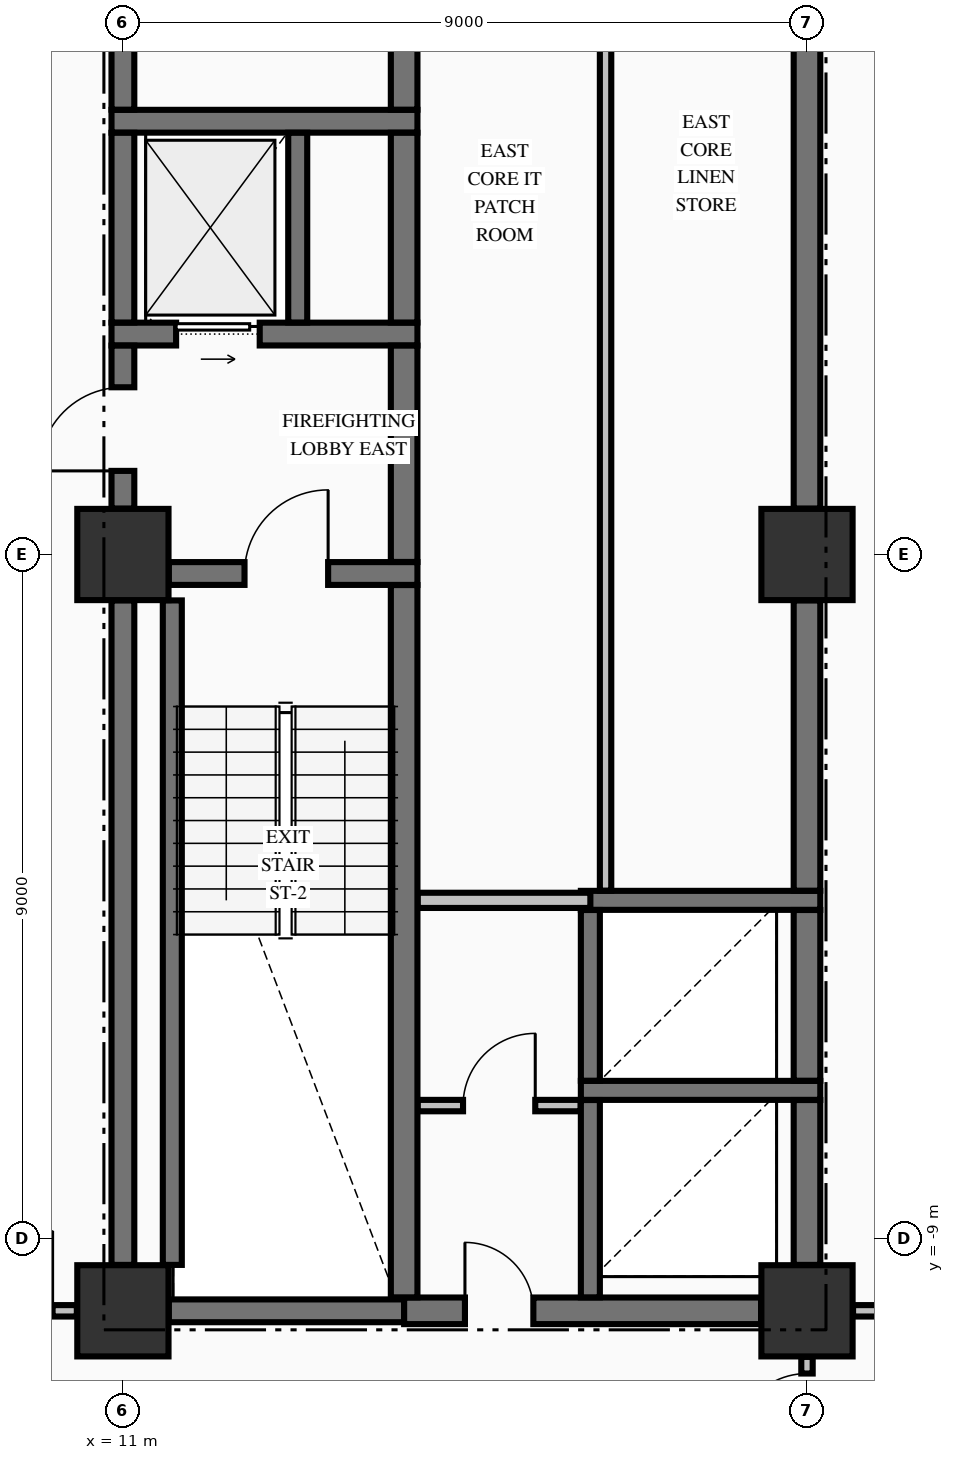
"""IFC4 building model, lengths in metres.
Left out: names, types, materials, properties, quantities, classifications, styles, units other than length and angle.
Written with IfcOpenShell. Run it as: python <this file> out.ifc"""

import sys

from ifc_helpers import new_model, si_unit, direction, frame, frame_2d, origin, origin_2d, place, context, subcontext, project, spatial, rectangle, extrude, element, fill, save


model = new_model("IFC4")
c1 = context("Model", 3, precision=1e-05, world=origin(), true_north=direction((0.0, 1.0)))
c2 = subcontext(c1, "Body", "Model", "MODEL_VIEW")
j1 = project(units=[si_unit("LENGTHUNIT", "METRE"), si_unit("PLANEANGLEUNIT", "RADIAN")], contexts=[c1])
p1 = place(None, origin())
s1 = spatial("IfcSite", under=j1, at=p1, CompositionType="ELEMENT")
p2 = place(p1, origin())
s2 = spatial("IfcBuilding", under=s1, at=p2, CompositionType="ELEMENT")
p3 = place(p2, frame((0.0, 0.0, 78.61)))
s3 = spatial("IfcBuildingStorey", under=s2, at=p3, CompositionType="ELEMENT", Elevation=78.61)
for number, where, z_axis, x_axis in (
    (1, (11.0, -9.95, -0.25), (0.0, 0.0, 1.0), (1.0, 0.0, 0.0)),
    (2, (11.0, 0.0, -0.25), (0.0, 0.0, 1.0), (1.0, 0.0, 0.0)),
    (3, (20.0, -9.95, -0.25), (0.0, 0.0, 1.0), (1.0, 0.0, 0.0)),
    (4, (20.0, 0.0, -0.25), (0.0, 0.0, 1.0), (1.0, 0.0, 0.0)),
):
    element("IfcColumn", number, at=place(p3, frame(where, z_axis=z_axis, x_axis=x_axis)), inside=s3, PredefinedType="COLUMN", context=c2, shape_type="SweptSolid", body=[
        extrude(rectangle(XDim=1.2, YDim=1.2, at=origin_2d()), origin(), (0.0, 0.0, 1.0), 3.395),
    ])
p4 = place(p3, frame((11.604, -9.95, 0.0), z_axis=(0.0, 0.0, 1.0), x_axis=(1.0, 0.0, 0.0)))
e5 = element("IfcWall", 5, at=p4, inside=s3, PredefinedType="SHEAR", context=c2, shape_type="SweptSolid", body=[
    extrude(rectangle(XDim=3.096, YDim=0.3, at=frame_2d((1.548, 0.0))), origin(), (0.0, 0.0, 1.0), 3.145),
])
p5 = place(p3, frame((14.7, -9.95, 0.0), z_axis=(0.0, 0.0, 1.0), x_axis=(1.0, 0.0, 0.0)))
e6 = element("IfcWall", 6, at=p5, inside=s3, PredefinedType="SHEAR", context=c2, shape_type="SweptSolid", body=[
    extrude(rectangle(XDim=4.696, YDim=0.35, at=frame_2d((2.348, 0.0))), origin(), (0.0, 0.0, 1.0), 3.145),
])
p6 = place(p5, frame((0.8, 0.0, 0.0)))
e7 = element("IfcOpeningElement", 7, at=p6, cuts=e6, PredefinedType="OPENING", context=c2, shape_type="SweptSolid", body=[
    extrude(rectangle(XDim=0.9, YDim=2.15, at=frame_2d((0.45, 1.075))), frame((0.0, 0.185, 0.0), z_axis=(0.0, -1.0, 0.0), x_axis=(1.0, 0.0, 0.0)), (0.0, 0.0, 1.0), 0.37),
])
for number, where, z_axis, x_axis in (
    (8, (17.025, -7.05, 0.0), (0.0, 0.0, 1.0), (1.0, 0.0, 0.0)),
    (9, (17.025, -4.55, 0.0), (0.0, 0.0, 1.0), (1.0, 0.0, 0.0)),
):
    element("IfcWall", number, at=place(p3, frame(where, z_axis=z_axis, x_axis=x_axis)), inside=s3, PredefinedType="SOLIDWALL", context=c2, shape_type="SweptSolid", body=[
        extrude(rectangle(XDim=3.15, YDim=0.25, at=frame_2d((1.575, 0.0))), origin(), (0.0, 0.0, 1.0), 3.145),
    ])
p7 = place(p3, frame((11.604, -0.25, 0.0), z_axis=(0.0, 0.0, 1.0), x_axis=(1.0, 0.0, 0.0)))
e10 = element("IfcWall", 10, at=p7, inside=s3, PredefinedType="SHEAR", context=c2, shape_type="SweptSolid", body=[
    extrude(rectangle(XDim=3.271, YDim=0.3, at=frame_2d((1.635, 0.0))), origin(), (0.0, 0.0, 1.0), 3.145),
])
p8 = place(p7, frame((0.996, 0.0, 0.0)))
e11 = element("IfcOpeningElement", 11, at=p8, cuts=e10, PredefinedType="OPENING", context=c2, shape_type="SweptSolid", body=[
    extrude(rectangle(XDim=1.1, YDim=2.15, at=frame_2d((0.55, 1.075))), frame((0.0, 0.16, 0.0), z_axis=(0.0, -1.0, 0.0), x_axis=(1.0, 0.0, 0.0)), (0.0, 0.0, 1.0), 0.32),
])
p9 = place(p3, frame((10.85, 2.9, 0.0), z_axis=(0.0, 0.0, 1.0), x_axis=(1.0, 0.0, 0.0)))
e12 = element("IfcWall", 12, at=p9, inside=s3, PredefinedType="SHEAR", context=c2, shape_type="SweptSolid", body=[
    extrude(rectangle(XDim=4.025, YDim=0.3, at=frame_2d((2.012, 0.0))), origin(), (0.0, 0.0, 1.0), 3.145),
])
p10 = place(p9, frame((0.85, 0.0, 0.0)))
e13 = element("IfcOpeningElement", 13, at=p10, cuts=e12, PredefinedType="OPENING", context=c2, shape_type="SweptSolid", body=[
    extrude(rectangle(XDim=1.1, YDim=2.2, at=frame_2d((0.55, 1.1))), frame((0.0, 0.16, 0.0), z_axis=(0.0, -1.0, 0.0), x_axis=(1.0, 0.0, 0.0)), (0.0, 0.0, 1.0), 0.32),
])
p11 = place(p3, frame((10.85, 5.7, 0.0), z_axis=(0.0, 0.0, 1.0), x_axis=(1.0, 0.0, 0.0)))
e14 = element("IfcWall", 14, at=p11, inside=s3, PredefinedType="SHEAR", context=c2, shape_type="SweptSolid", body=[
    extrude(rectangle(XDim=4.025, YDim=0.3, at=frame_2d((2.012, 0.0))), origin(), (0.0, 0.0, 1.0), 3.145),
])
p12 = place(p3, frame((-10.394, -9.95, 0.0), z_axis=(0.0, 0.0, 1.0), x_axis=(1.0, 0.0, 0.0)))
e15 = element("IfcWall", 15, at=p12, inside=s3, PredefinedType="PARTITIONING", context=c2, shape_type="SweptSolid", body=[
    extrude(rectangle(XDim=20.788, YDim=0.15, at=frame_2d((10.394, 0.0))), origin(), (0.0, 0.0, 1.0), 3.145),
])
p13 = place(p12, frame((0.319, 0.0, 0.0)))
e16 = element("IfcOpeningElement", 16, at=p13, cuts=e15, PredefinedType="OPENING", context=c2, shape_type="SweptSolid", body=[
    extrude(rectangle(XDim=1.05, YDim=2.15, at=frame_2d((0.525, 1.075))), frame((0.0, 0.085, 0.0), z_axis=(0.0, -1.0, 0.0), x_axis=(1.0, 0.0, 0.0)), (0.0, 0.0, 1.0), 0.17),
])
p14 = place(p12, frame((19.419, 0.0, 0.0)))
e17 = element("IfcOpeningElement", 17, at=p14, cuts=e15, PredefinedType="OPENING", context=c2, shape_type="SweptSolid", body=[
    extrude(rectangle(XDim=1.05, YDim=2.15, at=frame_2d((0.525, 1.075))), frame((0.0, 0.085, 0.0), z_axis=(0.0, -1.0, 0.0), x_axis=(1.0, 0.0, 0.0)), (0.0, 0.0, 1.0), 0.17),
])
p15 = place(p12, frame((11.569, 0.0, 0.0)))
e18 = element("IfcOpeningElement", 18, at=p15, cuts=e15, PredefinedType="OPENING", context=c2, shape_type="SweptSolid", body=[
    extrude(rectangle(XDim=0.95, YDim=2.15, at=frame_2d((0.475, 1.075))), frame((0.0, 0.085, 0.0), z_axis=(0.0, -1.0, 0.0), x_axis=(1.0, 0.0, 0.0)), (0.0, 0.0, 1.0), 0.17),
])
p16 = place(p3, frame((20.606, -9.95, 0.0), z_axis=(0.0, 0.0, 1.0), x_axis=(1.0, 0.0, 0.0)))
e19 = element("IfcWall", 19, at=p16, inside=s3, PredefinedType="PARTITIONING", context=c2, shape_type="SweptSolid", body=[
    extrude(rectangle(XDim=3.229, YDim=0.15, at=frame_2d((1.615, 0.0))), origin(), (0.0, 0.0, 1.0), 3.145),
])
p17 = place(p16, frame((0.894, 0.0, 0.0)))
e20 = element("IfcOpeningElement", 20, at=p17, cuts=e19, PredefinedType="OPENING", context=c2, shape_type="SweptSolid", body=[
    extrude(rectangle(XDim=1.0, YDim=2.15, at=frame_2d((0.5, 1.075))), frame((0.0, 0.085, 0.0), z_axis=(0.0, -1.0, 0.0), x_axis=(1.0, 0.0, 0.0)), (0.0, 0.0, 1.0), 0.17),
])
p18 = place(p3, frame((14.878, -7.25, 0.0), z_axis=(0.0, 0.0, 1.0), x_axis=(1.0, 0.0, 0.0)))
e21 = element("IfcWall", 21, at=p18, inside=s3, PredefinedType="PARTITIONING", context=c2, shape_type="SweptSolid", body=[
    extrude(rectangle(XDim=2.144, YDim=0.15, at=frame_2d((1.072, 0.0))), origin(), (0.0, 0.0, 1.0), 3.145),
])
p19 = place(p18, frame((0.597, 0.0, 0.0)))
e22 = element("IfcOpeningElement", 22, at=p19, cuts=e21, PredefinedType="OPENING", context=c2, shape_type="SweptSolid", body=[
    extrude(rectangle(XDim=0.95, YDim=2.15, at=frame_2d((0.475, 1.075))), frame((0.0, 0.085, 0.0), z_axis=(0.0, -1.0, 0.0), x_axis=(1.0, 0.0, 0.0)), (0.0, 0.0, 1.0), 0.17),
])
p20 = place(p3, frame((14.878, -4.55, 0.0), z_axis=(0.0, 0.0, 1.0), x_axis=(1.0, 0.0, 0.0)))
e23 = element("IfcWall", 23, at=p20, inside=s3, PredefinedType="PARTITIONING", context=c2, shape_type="SweptSolid", body=[
    extrude(rectangle(XDim=2.272, YDim=0.2, at=frame_2d((1.136, 0.0))), origin(), (0.0, 0.0, 1.0), 3.145),
])
p21 = place(p3, frame((11.0, -9.346, 0.0), z_axis=(0.0, 0.0, 1.0), x_axis=(0.0, 1.0, 0.0)))
e24 = element("IfcWall", 24, at=p21, inside=s3, PredefinedType="SHEAR", context=c2, shape_type="SweptSolid", body=[
    extrude(rectangle(XDim=8.742, YDim=0.3, at=frame_2d((4.371, 0.0))), origin(), (0.0, 0.0, 1.0), 3.145),
])
p22 = place(p3, frame((11.0, 0.604, 0.0), z_axis=(0.0, 0.0, 1.0), x_axis=(0.0, 1.0, 0.0)))
e25 = element("IfcWall", 25, at=p22, inside=s3, PredefinedType="SHEAR", context=c2, shape_type="SweptSolid", body=[
    extrude(rectangle(XDim=2.144, YDim=0.3, at=frame_2d((1.072, 0.0))), origin(), (0.0, 0.0, 1.0), 3.145),
])
p23 = place(p22, frame((0.496, 0.0, 0.0)))
e26 = element("IfcOpeningElement", 26, at=p23, cuts=e25, PredefinedType="OPENING", context=c2, shape_type="SweptSolid", body=[
    extrude(rectangle(XDim=1.1, YDim=2.15, at=frame_2d((0.55, 1.075))), frame((0.0, 0.16, 0.0), z_axis=(0.0, -1.0, 0.0), x_axis=(1.0, 0.0, 0.0)), (0.0, 0.0, 1.0), 0.32),
])
p24 = place(p3, frame((11.0, 3.052, 0.0), z_axis=(0.0, 0.0, 1.0), x_axis=(0.0, 1.0, 0.0)))
e27 = element("IfcWall", 27, at=p24, inside=s3, PredefinedType="SHEAR", context=c2, shape_type="SweptSolid", body=[
    extrude(rectangle(XDim=2.496, YDim=0.3, at=frame_2d((1.248, 0.0))), origin(), (0.0, 0.0, 1.0), 3.145),
])
p25 = place(p3, frame((11.0, 5.852, 0.0), z_axis=(0.0, 0.0, 1.0), x_axis=(0.0, 1.0, 0.0)))
e28 = element("IfcWall", 28, at=p25, inside=s3, PredefinedType="SHEAR", context=c2, shape_type="SweptSolid", body=[
    extrude(rectangle(XDim=4.044, YDim=0.3, at=frame_2d((2.022, 0.0))), origin(), (0.0, 0.0, 1.0), 3.145),
])
p26 = place(p3, frame((11.65, -9.346, 0.0), z_axis=(0.0, 0.0, 1.0), x_axis=(0.0, 1.0, 0.0)))
e29 = element("IfcWall", 29, at=p26, inside=s3, PredefinedType="SOLIDWALL", context=c2, shape_type="SweptSolid", body=[
    extrude(rectangle(XDim=8.742, YDim=0.25, at=frame_2d((4.371, 0.0))), origin(), (0.0, 0.0, 1.0), 3.145),
])
p27 = place(p3, frame((13.3, 3.052, 0.0), z_axis=(0.0, 0.0, 1.0), x_axis=(0.0, 1.0, 0.0)))
e30 = element("IfcWall", 30, at=p27, inside=s3, PredefinedType="SOLIDWALL", context=c2, shape_type="SweptSolid", body=[
    extrude(rectangle(XDim=2.496, YDim=0.25, at=frame_2d((1.248, 0.0))), origin(), (0.0, 0.0, 1.0), 3.145),
])
p28 = place(p3, frame((14.7, -9.773, 0.0), z_axis=(0.0, 0.0, 1.0), x_axis=(0.0, 1.0, 0.0)))
e31 = element("IfcWall", 31, at=p28, inside=s3, PredefinedType="SHEAR", context=c2, shape_type="SweptSolid", body=[
    extrude(rectangle(XDim=9.371, YDim=0.35, at=frame_2d((4.686, 0.0))), origin(), (0.0, 0.0, 1.0), 3.145),
])
p29 = place(p3, frame((14.7, -0.098, 0.0), z_axis=(0.0, 0.0, 1.0), x_axis=(0.0, 1.0, 0.0)))
e32 = element("IfcWall", 32, at=p29, inside=s3, PredefinedType="SHEAR", context=c2, shape_type="SweptSolid", body=[
    extrude(rectangle(XDim=2.846, YDim=0.35, at=frame_2d((1.423, 0.0))), origin(), (0.0, 0.0, 1.0), 3.145),
])
p30 = place(p3, frame((14.7, 3.052, 0.0), z_axis=(0.0, 0.0, 1.0), x_axis=(0.0, 1.0, 0.0)))
e33 = element("IfcWall", 33, at=p30, inside=s3, PredefinedType="SHEAR", context=c2, shape_type="SweptSolid", body=[
    extrude(rectangle(XDim=2.496, YDim=0.35, at=frame_2d((1.248, 0.0))), origin(), (0.0, 0.0, 1.0), 3.145),
])
p31 = place(p3, frame((14.7, 5.852, 0.0), z_axis=(0.0, 0.0, 1.0), x_axis=(0.0, 1.0, 0.0)))
e34 = element("IfcWall", 34, at=p31, inside=s3, PredefinedType="SHEAR", context=c2, shape_type="SweptSolid", body=[
    extrude(rectangle(XDim=4.471, YDim=0.35, at=frame_2d((2.235, 0.0))), origin(), (0.0, 0.0, 1.0), 3.145),
])
p32 = place(p3, frame((17.15, -9.773, 0.0), z_axis=(0.0, 0.0, 1.0), x_axis=(0.0, 1.0, 0.0)))
e35 = element("IfcWall", 35, at=p32, inside=s3, PredefinedType="SOLIDWALL", context=c2, shape_type="SweptSolid", body=[
    extrude(rectangle(XDim=2.596, YDim=0.25, at=frame_2d((1.298, 0.0))), origin(), (0.0, 0.0, 1.0), 3.145),
])
p33 = place(p3, frame((17.15, -6.923, 0.0), z_axis=(0.0, 0.0, 1.0), x_axis=(0.0, 1.0, 0.0)))
e36 = element("IfcWall", 36, at=p33, inside=s3, PredefinedType="SOLIDWALL", context=c2, shape_type="SweptSolid", body=[
    extrude(rectangle(XDim=2.246, YDim=0.25, at=frame_2d((1.123, 0.0))), origin(), (0.0, 0.0, 1.0), 3.145),
])
p34 = place(p3, frame((20.0, -9.346, 0.0), z_axis=(0.0, 0.0, 1.0), x_axis=(0.0, 1.0, 0.0)))
e37 = element("IfcWall", 37, at=p34, inside=s3, PredefinedType="SHEAR", context=c2, shape_type="SweptSolid", body=[
    extrude(rectangle(XDim=2.169, YDim=0.35, at=frame_2d((1.084, 0.0))), origin(), (0.0, 0.0, 1.0), 3.145),
])
p35 = place(p3, frame((20.0, -6.923, 0.0), z_axis=(0.0, 0.0, 1.0), x_axis=(0.0, 1.0, 0.0)))
e38 = element("IfcWall", 38, at=p35, inside=s3, PredefinedType="SHEAR", context=c2, shape_type="SweptSolid", body=[
    extrude(rectangle(XDim=2.246, YDim=0.35, at=frame_2d((1.123, 0.0))), origin(), (0.0, 0.0, 1.0), 3.145),
])
p36 = place(p3, frame((20.0, -4.423, 0.0), z_axis=(0.0, 0.0, 1.0), x_axis=(0.0, 1.0, 0.0)))
e39 = element("IfcWall", 39, at=p36, inside=s3, PredefinedType="SHEAR", context=c2, shape_type="SweptSolid", body=[
    extrude(rectangle(XDim=3.819, YDim=0.35, at=frame_2d((1.91, 0.0))), origin(), (0.0, 0.0, 1.0), 3.145),
])
p37 = place(p3, frame((20.0, 0.604, 0.0), z_axis=(0.0, 0.0, 1.0), x_axis=(0.0, 1.0, 0.0)))
e40 = element("IfcWall", 40, at=p37, inside=s3, PredefinedType="SHEAR", context=c2, shape_type="SweptSolid", body=[
    extrude(rectangle(XDim=9.292, YDim=0.35, at=frame_2d((4.646, 0.0))), origin(), (0.0, 0.0, 1.0), 3.145),
])
p38 = place(p3, frame((17.35, -4.422, 0.0), z_axis=(0.0, 0.0, 1.0), x_axis=(0.0, 1.0, 0.0)))
e41 = element("IfcWall", 41, at=p38, inside=s3, PredefinedType="PARTITIONING", context=c2, shape_type="SweptSolid", body=[
    extrude(rectangle(XDim=14.744, YDim=0.15, at=frame_2d((7.372, 0.0))), origin(), (0.0, 0.0, 1.0), 3.145),
])
p39 = place(p3, frame((20.0, -12.472, 0.0), z_axis=(0.0, 0.0, 1.0), x_axis=(0.0, 1.0, 0.0)))
e42 = element("IfcWall", 42, at=p39, inside=s3, PredefinedType="PARTITIONING", context=c2, shape_type="SweptSolid", body=[
    extrude(rectangle(XDim=1.916, YDim=0.15, at=frame_2d((0.958, 0.0))), origin(), (0.0, 0.0, 1.0), 3.145),
])
p40 = place(p39, frame((0.747, 0.0, 0.0)))
e43 = element("IfcOpeningElement", 43, at=p40, cuts=e42, PredefinedType="OPENING", context=c2, shape_type="SweptSolid", body=[
    extrude(rectangle(XDim=0.95, YDim=2.15, at=frame_2d((0.475, 1.075))), frame((0.0, 0.085, 0.0), z_axis=(0.0, -1.0, 0.0), x_axis=(1.0, 0.0, 0.0)), (0.0, 0.0, 1.0), 0.17),
])
p41 = place(p8, origin())
e44 = element("IfcDoor", 44, at=p41, inside=s3, OperationType="SINGLE_SWING_RIGHT", PredefinedType="DOOR", context=c2, shape_type="SweptSolid", body=[
    extrude(rectangle(XDim=1.1, YDim=2.15, at=frame_2d((0.55, 1.075))), frame((0.0, 0.025, 0.0), z_axis=(0.0, -1.0, 0.0), x_axis=(1.0, 0.0, 0.0)), (0.0, 0.0, 1.0), 0.05),
])
fill(e11, e44)
p42 = place(p23, origin())
e45 = element("IfcDoor", 45, at=p42, inside=s3, OperationType="SINGLE_SWING_LEFT", PredefinedType="DOOR", context=c2, shape_type="SweptSolid", body=[
    extrude(rectangle(XDim=1.1, YDim=2.15, at=frame_2d((0.55, 1.075))), frame((0.0, 0.025, 0.0), z_axis=(0.0, -1.0, 0.0), x_axis=(1.0, 0.0, 0.0)), (0.0, 0.0, 1.0), 0.05),
])
fill(e26, e45)
p43 = place(p10, origin())
e46 = element("IfcDoor", 46, at=p43, inside=s3, OperationType="SLIDING_TO_RIGHT", PredefinedType="DOOR", context=c2, shape_type="SweptSolid", body=[
    extrude(rectangle(XDim=1.1, YDim=2.2, at=frame_2d((0.55, 1.1))), frame((0.0, 0.025, 0.0), z_axis=(0.0, -1.0, 0.0), x_axis=(1.0, 0.0, 0.0)), (0.0, 0.0, 1.0), 0.05),
])
fill(e13, e46)
p44 = place(p6, origin())
e47 = element("IfcDoor", 47, at=p44, inside=s3, OperationType="SINGLE_SWING_LEFT", PredefinedType="DOOR", context=c2, shape_type="SweptSolid", body=[
    extrude(rectangle(XDim=0.9, YDim=2.15, at=frame_2d((0.45, 1.075))), frame((0.0, 0.025, 0.0), z_axis=(0.0, -1.0, 0.0), x_axis=(1.0, 0.0, 0.0)), (0.0, 0.0, 1.0), 0.05),
])
fill(e7, e47)
p45 = place(p19, origin())
e48 = element("IfcDoor", 48, at=p45, inside=s3, OperationType="SINGLE_SWING_RIGHT", PredefinedType="DOOR", context=c2, shape_type="SweptSolid", body=[
    extrude(rectangle(XDim=0.95, YDim=2.15, at=frame_2d((0.475, 1.075))), frame((0.0, 0.025, 0.0), z_axis=(0.0, -1.0, 0.0), x_axis=(1.0, 0.0, 0.0)), (0.0, 0.0, 1.0), 0.05),
])
fill(e22, e48)
p46 = place(p40, origin())
e49 = element("IfcDoor", 49, at=p46, inside=s3, OperationType="SINGLE_SWING_LEFT", PredefinedType="DOOR", context=c2, shape_type="SweptSolid", body=[
    extrude(rectangle(XDim=0.95, YDim=2.15, at=frame_2d((0.475, 1.075))), frame((0.0, 0.025, 0.0), z_axis=(0.0, -1.0, 0.0), x_axis=(1.0, 0.0, 0.0)), (0.0, 0.0, 1.0), 0.05),
])
fill(e43, e49)
save(model, sys.argv[1])
